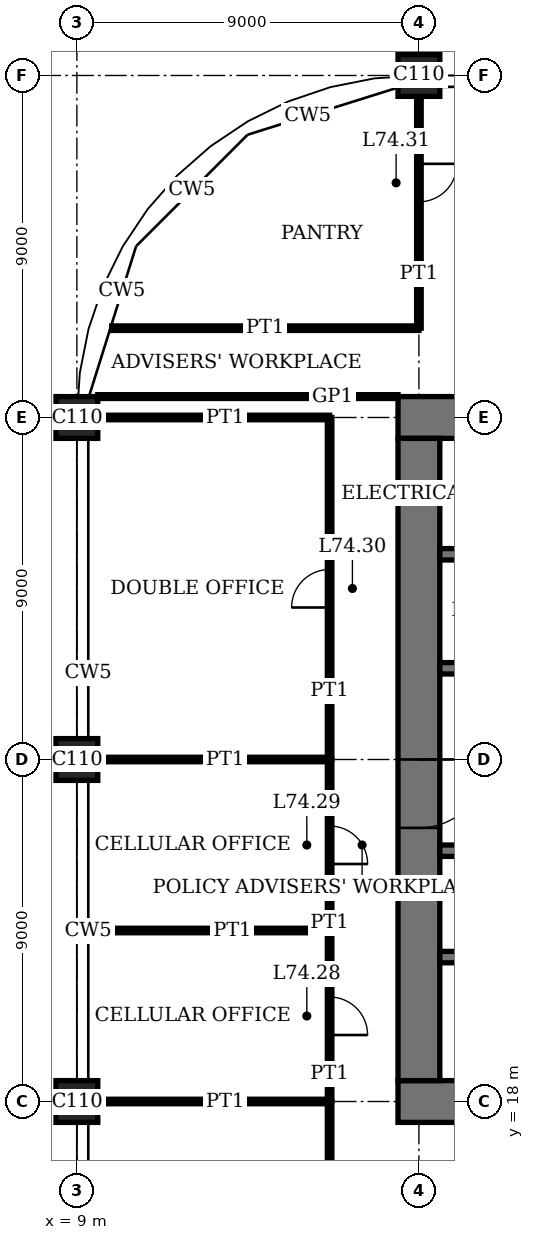
"""IFC4 building model, lengths in metres.
Left out: names, types, materials, properties, quantities, classifications, styles, units other than length and angle.
Written with IfcOpenShell. Run it as: python <this file> out.ifc"""

import sys

from ifc_helpers import new_model, si_unit, direction, frame, frame_2d, origin, origin_2d, place, context, subcontext, project, spatial, rectangle, extrude, element, fill, save


model = new_model("IFC4")
c1 = context("Model", 3, precision=1e-05, world=origin(), true_north=direction((0.0, 1.0)))
c2 = subcontext(c1, "Body", "Model", "MODEL_VIEW")
j1 = project(units=[si_unit("LENGTHUNIT", "METRE"), si_unit("PLANEANGLEUNIT", "RADIAN")], contexts=[c1])
p1 = place(None, origin())
s1 = spatial("IfcSite", under=j1, at=p1, CompositionType="ELEMENT")
p2 = place(p1, origin())
s2 = spatial("IfcBuilding", under=s1, at=p2, CompositionType="ELEMENT")
p3 = place(p2, frame((0.0, 0.0, 303.4)))
s3 = spatial("IfcBuildingStorey", under=s2, at=p3, CompositionType="ELEMENT", Elevation=303.4)
for number, where, z_axis, x_axis in (
    (1, (9.0, 18.0, 0.0), (0.0, 0.0, 1.0), (1.0, 0.0, 0.0)),
    (2, (9.0, 27.0, 0.0), (0.0, 0.0, 1.0), (1.0, 0.0, 0.0)),
    (3, (9.0, 36.0, 0.0), (0.0, 0.0, 1.0), (1.0, 0.0, 0.0)),
    (4, (18.0, 45.0, 0.0), (0.0, 0.0, 1.0), (1.0, 0.0, 0.0)),
):
    element("IfcColumn", number, at=place(p3, frame(where, z_axis=z_axis, x_axis=x_axis)), inside=s3, PredefinedType="COLUMN", context=c2, shape_type="SweptSolid", body=[
        extrude(rectangle(XDim=1.1, YDim=1.1, at=origin_2d()), origin(), (0.0, 0.0, 1.0), 4.0),
    ])
p4 = place(p3, frame((17.45, 18.0, 0.0), z_axis=(0.0, 0.0, 1.0), x_axis=(1.0, 0.0, 0.0)))
e5 = element("IfcWall", 5, at=p4, inside=s3, PredefinedType="SHEAR", context=c2, shape_type="SweptSolid", body=[
    extrude(rectangle(XDim=28.1, YDim=1.1, at=frame_2d((14.05, 0.0))), origin(), (0.0, 0.0, 1.0), 4.0),
])
p5 = place(p4, frame((11.55, 0.0, 0.0)))
e6 = element("IfcOpeningElement", 6, at=p5, cuts=e5, PredefinedType="OPENING", context=c2, shape_type="SweptSolid", body=[
    extrude(rectangle(XDim=1.0, YDim=2.4, at=frame_2d((0.5, 1.2))), frame((0.0, 0.56, 0.0), z_axis=(0.0, -1.0, 0.0), x_axis=(1.0, 0.0, 0.0)), (0.0, 0.0, 1.0), 1.12),
])
p6 = place(p4, frame((16.55, 0.0, 0.0)))
e7 = element("IfcOpeningElement", 7, at=p6, cuts=e5, PredefinedType="OPENING", context=c2, shape_type="SweptSolid", body=[
    extrude(rectangle(XDim=1.0, YDim=2.4, at=frame_2d((0.5, 1.2))), frame((0.0, 0.56, 0.0), z_axis=(0.0, -1.0, 0.0), x_axis=(1.0, 0.0, 0.0)), (0.0, 0.0, 1.0), 1.12),
])
p7 = place(p4, frame((20.0, 0.0, 0.0)))
e8 = element("IfcOpeningElement", 8, at=p7, cuts=e5, PredefinedType="OPENING", context=c2, shape_type="SweptSolid", body=[
    extrude(rectangle(XDim=1.1, YDim=2.4, at=frame_2d((0.55, 1.2))), frame((0.0, 0.56, 0.0), z_axis=(0.0, -1.0, 0.0), x_axis=(1.0, 0.0, 0.0)), (0.0, 0.0, 1.0), 1.12),
])
p8 = place(p4, frame((24.05, 0.0, 0.0)))
e9 = element("IfcOpeningElement", 9, at=p8, cuts=e5, PredefinedType="OPENING", context=c2, shape_type="SweptSolid", body=[
    extrude(rectangle(XDim=1.0, YDim=2.4, at=frame_2d((0.5, 1.2))), frame((0.0, 0.56, 0.0), z_axis=(0.0, -1.0, 0.0), x_axis=(1.0, 0.0, 0.0)), (0.0, 0.0, 1.0), 1.12),
])
p9 = place(p3, frame((45.55, 36.0, 0.0), z_axis=(0.0, 0.0, 1.0), x_axis=(-1.0, 0.0, 0.0)))
e10 = element("IfcWall", 10, at=p9, inside=s3, PredefinedType="SHEAR", context=c2, shape_type="SweptSolid", body=[
    extrude(rectangle(XDim=28.1, YDim=1.1, at=frame_2d((14.05, 0.0))), origin(), (0.0, 0.0, 1.0), 4.0),
])
p10 = place(p9, frame((11.55, 0.0, 0.0)))
e11 = element("IfcOpeningElement", 11, at=p10, cuts=e10, PredefinedType="OPENING", context=c2, shape_type="SweptSolid", body=[
    extrude(rectangle(XDim=1.0, YDim=2.4, at=frame_2d((0.5, 1.2))), frame((0.0, 0.56, 0.0), z_axis=(0.0, -1.0, 0.0), x_axis=(1.0, 0.0, 0.0)), (0.0, 0.0, 1.0), 1.12),
])
p11 = place(p9, frame((16.55, 0.0, 0.0)))
e12 = element("IfcOpeningElement", 12, at=p11, cuts=e10, PredefinedType="OPENING", context=c2, shape_type="SweptSolid", body=[
    extrude(rectangle(XDim=1.0, YDim=2.4, at=frame_2d((0.5, 1.2))), frame((0.0, 0.56, 0.0), z_axis=(0.0, -1.0, 0.0), x_axis=(1.0, 0.0, 0.0)), (0.0, 0.0, 1.0), 1.12),
])
p12 = place(p9, frame((20.0, 0.0, 0.0)))
e13 = element("IfcOpeningElement", 13, at=p12, cuts=e10, PredefinedType="OPENING", context=c2, shape_type="SweptSolid", body=[
    extrude(rectangle(XDim=1.1, YDim=2.4, at=frame_2d((0.55, 1.2))), frame((0.0, 0.56, 0.0), z_axis=(0.0, -1.0, 0.0), x_axis=(1.0, 0.0, 0.0)), (0.0, 0.0, 1.0), 1.12),
])
p13 = place(p9, frame((24.05, 0.0, 0.0)))
e14 = element("IfcOpeningElement", 14, at=p13, cuts=e10, PredefinedType="OPENING", context=c2, shape_type="SweptSolid", body=[
    extrude(rectangle(XDim=1.0, YDim=2.4, at=frame_2d((0.5, 1.2))), frame((0.0, 0.56, 0.0), z_axis=(0.0, -1.0, 0.0), x_axis=(1.0, 0.0, 0.0)), (0.0, 0.0, 1.0), 1.12),
])
p14 = place(p3, frame((18.0, 35.45, 0.0), z_axis=(0.0, 0.0, 1.0), x_axis=(0.0, -1.0, 0.0)))
e15 = element("IfcWall", 15, at=p14, inside=s3, PredefinedType="SHEAR", context=c2, shape_type="SweptSolid", body=[
    extrude(rectangle(XDim=16.9, YDim=1.1, at=frame_2d((8.45, 0.0))), origin(), (0.0, 0.0, 1.0), 4.0),
])
p15 = place(p14, frame((8.45, 0.0, 0.0)))
e16 = element("IfcOpeningElement", 16, at=p15, cuts=e15, PredefinedType="OPENING", context=c2, shape_type="SweptSolid", body=[
    extrude(rectangle(XDim=1.8, YDim=2.4, at=frame_2d((0.9, 1.2))), frame((0.0, 0.56, 0.0), z_axis=(0.0, -1.0, 0.0), x_axis=(1.0, 0.0, 0.0)), (0.0, 0.0, 1.0), 1.12),
])
p16 = place(p3, frame((18.55, 21.8, 0.0), z_axis=(0.0, 0.0, 1.0), x_axis=(1.0, 0.0, 0.0)))
e17 = element("IfcWall", 17, at=p16, inside=s3, PredefinedType="SHEAR", context=c2, shape_type="SweptSolid", body=[
    extrude(rectangle(XDim=8.3, YDim=0.3, at=frame_2d((4.15, 0.0))), origin(), (0.0, 0.0, 1.0), 4.0),
])
p17 = place(p16, frame((6.85, 0.0, 0.0)))
e18 = element("IfcOpeningElement", 18, at=p17, cuts=e17, PredefinedType="OPENING", context=c2, shape_type="SweptSolid", body=[
    extrude(rectangle(XDim=1.0, YDim=2.4, at=frame_2d((0.5, 1.2))), frame((0.0, 0.16, 0.0), z_axis=(0.0, -1.0, 0.0), x_axis=(1.0, 0.0, 0.0)), (0.0, 0.0, 1.0), 0.32),
])
p18 = place(p3, frame((18.55, 24.6, 0.0), z_axis=(0.0, 0.0, 1.0), x_axis=(1.0, 0.0, 0.0)))
e19 = element("IfcWall", 19, at=p18, inside=s3, PredefinedType="SHEAR", context=c2, shape_type="SweptSolid", body=[
    extrude(rectangle(XDim=25.9, YDim=0.3, at=frame_2d((12.95, 0.0))), origin(), (0.0, 0.0, 1.0), 4.0),
])
p19 = place(p18, frame((4.95, 0.0, 0.0)))
e20 = element("IfcOpeningElement", 20, at=p19, cuts=e19, PredefinedType="OPENING", context=c2, shape_type="SweptSolid", body=[
    extrude(rectangle(XDim=1.0, YDim=2.4, at=frame_2d((0.5, 1.2))), frame((0.0, 0.16, 0.0), z_axis=(0.0, -1.0, 0.0), x_axis=(1.0, 0.0, 0.0)), (0.0, 0.0, 1.0), 0.32),
])
p20 = place(p18, frame((24.5, 0.0, 0.0)))
e21 = element("IfcOpeningElement", 21, at=p20, cuts=e19, PredefinedType="OPENING", context=c2, shape_type="SweptSolid", body=[
    extrude(rectangle(XDim=0.9, YDim=2.1, at=frame_2d((0.45, 1.05))), frame((0.0, 0.16, 0.0), z_axis=(0.0, -1.0, 0.0), x_axis=(1.0, 0.0, 0.0)), (0.0, 0.0, 1.0), 0.32),
])
p21 = place(p18, frame((9.4, 0.0, 0.0)))
e22 = element("IfcOpeningElement", 22, at=p21, cuts=e19, PredefinedType="OPENING", context=c2, shape_type="SweptSolid", body=[
    extrude(rectangle(XDim=1.1, YDim=2.4, at=frame_2d((0.55, 1.2))), frame((0.0, 0.16, 0.0), z_axis=(0.0, -1.0, 0.0), x_axis=(1.0, 0.0, 0.0)), (0.0, 0.0, 1.0), 0.32),
])
p22 = place(p18, frame((12.4, 0.0, 0.0)))
e23 = element("IfcOpeningElement", 23, at=p22, cuts=e19, PredefinedType="OPENING", context=c2, shape_type="SweptSolid", body=[
    extrude(rectangle(XDim=1.1, YDim=2.4, at=frame_2d((0.55, 1.2))), frame((0.0, 0.16, 0.0), z_axis=(0.0, -1.0, 0.0), x_axis=(1.0, 0.0, 0.0)), (0.0, 0.0, 1.0), 0.32),
])
p23 = place(p18, frame((15.4, 0.0, 0.0)))
e24 = element("IfcOpeningElement", 24, at=p23, cuts=e19, PredefinedType="OPENING", context=c2, shape_type="SweptSolid", body=[
    extrude(rectangle(XDim=1.1, YDim=2.4, at=frame_2d((0.55, 1.2))), frame((0.0, 0.16, 0.0), z_axis=(0.0, -1.0, 0.0), x_axis=(1.0, 0.0, 0.0)), (0.0, 0.0, 1.0), 0.32),
])
p24 = place(p18, frame((18.4, 0.0, 0.0)))
e25 = element("IfcOpeningElement", 25, at=p24, cuts=e19, PredefinedType="OPENING", context=c2, shape_type="SweptSolid", body=[
    extrude(rectangle(XDim=1.1, YDim=2.4, at=frame_2d((0.55, 1.2))), frame((0.0, 0.16, 0.0), z_axis=(0.0, -1.0, 0.0), x_axis=(1.0, 0.0, 0.0)), (0.0, 0.0, 1.0), 0.32),
])
p25 = place(p18, frame((21.3, 0.0, 0.0)))
e26 = element("IfcOpeningElement", 26, at=p25, cuts=e19, PredefinedType="OPENING", context=c2, shape_type="SweptSolid", body=[
    extrude(rectangle(XDim=1.3, YDim=2.4, at=frame_2d((0.65, 1.2))), frame((0.0, 0.16, 0.0), z_axis=(0.0, -1.0, 0.0), x_axis=(1.0, 0.0, 0.0)), (0.0, 0.0, 1.0), 0.32),
])
p26 = place(p3, frame((18.55, 29.4, 0.0), z_axis=(0.0, 0.0, 1.0), x_axis=(1.0, 0.0, 0.0)))
e27 = element("IfcWall", 27, at=p26, inside=s3, PredefinedType="SHEAR", context=c2, shape_type="SweptSolid", body=[
    extrude(rectangle(XDim=25.9, YDim=0.3, at=frame_2d((12.95, 0.0))), origin(), (0.0, 0.0, 1.0), 4.0),
])
p27 = place(p26, frame((19.95, 0.0, 0.0)))
e28 = element("IfcOpeningElement", 28, at=p27, cuts=e27, PredefinedType="OPENING", context=c2, shape_type="SweptSolid", body=[
    extrude(rectangle(XDim=1.0, YDim=2.4, at=frame_2d((0.5, 1.2))), frame((0.0, 0.16, 0.0), z_axis=(0.0, -1.0, 0.0), x_axis=(1.0, 0.0, 0.0)), (0.0, 0.0, 1.0), 0.32),
])
p28 = place(p26, frame((0.5, 0.0, 0.0)))
e29 = element("IfcOpeningElement", 29, at=p28, cuts=e27, PredefinedType="OPENING", context=c2, shape_type="SweptSolid", body=[
    extrude(rectangle(XDim=0.9, YDim=2.1, at=frame_2d((0.45, 1.05))), frame((0.0, 0.16, 0.0), z_axis=(0.0, -1.0, 0.0), x_axis=(1.0, 0.0, 0.0)), (0.0, 0.0, 1.0), 0.32),
])
p29 = place(p26, frame((15.45, 0.0, 0.0)))
e30 = element("IfcOpeningElement", 30, at=p29, cuts=e27, PredefinedType="OPENING", context=c2, shape_type="SweptSolid", body=[
    extrude(rectangle(XDim=1.0, YDim=2.4, at=frame_2d((0.5, 1.2))), frame((0.0, 0.16, 0.0), z_axis=(0.0, -1.0, 0.0), x_axis=(1.0, 0.0, 0.0)), (0.0, 0.0, 1.0), 0.32),
])
p30 = place(p26, frame((12.45, 0.0, 0.0)))
e31 = element("IfcOpeningElement", 31, at=p30, cuts=e27, PredefinedType="OPENING", context=c2, shape_type="SweptSolid", body=[
    extrude(rectangle(XDim=1.0, YDim=2.4, at=frame_2d((0.5, 1.2))), frame((0.0, 0.16, 0.0), z_axis=(0.0, -1.0, 0.0), x_axis=(1.0, 0.0, 0.0)), (0.0, 0.0, 1.0), 0.32),
])
p31 = place(p26, frame((9.45, 0.0, 0.0)))
e32 = element("IfcOpeningElement", 32, at=p31, cuts=e27, PredefinedType="OPENING", context=c2, shape_type="SweptSolid", body=[
    extrude(rectangle(XDim=1.0, YDim=2.4, at=frame_2d((0.5, 1.2))), frame((0.0, 0.16, 0.0), z_axis=(0.0, -1.0, 0.0), x_axis=(1.0, 0.0, 0.0)), (0.0, 0.0, 1.0), 0.32),
])
p32 = place(p26, frame((6.45, 0.0, 0.0)))
e33 = element("IfcOpeningElement", 33, at=p32, cuts=e27, PredefinedType="OPENING", context=c2, shape_type="SweptSolid", body=[
    extrude(rectangle(XDim=1.0, YDim=2.4, at=frame_2d((0.5, 1.2))), frame((0.0, 0.16, 0.0), z_axis=(0.0, -1.0, 0.0), x_axis=(1.0, 0.0, 0.0)), (0.0, 0.0, 1.0), 0.32),
])
p33 = place(p26, frame((3.3, 0.0, 0.0)))
e34 = element("IfcOpeningElement", 34, at=p33, cuts=e27, PredefinedType="OPENING", context=c2, shape_type="SweptSolid", body=[
    extrude(rectangle(XDim=1.3, YDim=2.4, at=frame_2d((0.65, 1.2))), frame((0.0, 0.16, 0.0), z_axis=(0.0, -1.0, 0.0), x_axis=(1.0, 0.0, 0.0)), (0.0, 0.0, 1.0), 0.32),
])
p34 = place(p3, frame((18.55, 32.4, 0.0), z_axis=(0.0, 0.0, 1.0), x_axis=(1.0, 0.0, 0.0)))
e35 = element("IfcWall", 35, at=p34, inside=s3, PredefinedType="SHEAR", context=c2, shape_type="SweptSolid", body=[
    extrude(rectangle(XDim=17.3, YDim=0.3, at=frame_2d((8.65, 0.0))), origin(), (0.0, 0.0, 1.0), 4.0),
])
p35 = place(p3, frame((9.55, 18.0, 0.0), z_axis=(0.0, 0.0, 1.0), x_axis=(1.0, 0.0, 0.0)))
e36 = element("IfcWall", 36, at=p35, inside=s3, PredefinedType="PARTITIONING", context=c2, shape_type="SweptSolid", body=[
    extrude(rectangle(XDim=6.1, YDim=0.12, at=frame_2d((3.05, 0.0))), origin(), (0.0, 0.0, 1.0), 3.05),
])
p36 = place(p3, frame((9.31, 22.5, 0.0), z_axis=(0.0, 0.0, 1.0), x_axis=(1.0, 0.0, 0.0)))
e37 = element("IfcWall", 37, at=p36, inside=s3, PredefinedType="PARTITIONING", context=c2, shape_type="SweptSolid", body=[
    extrude(rectangle(XDim=6.34, YDim=0.12, at=frame_2d((3.17, 0.0))), origin(), (0.0, 0.0, 1.0), 3.1),
])
for number, where, z_axis, x_axis in (
    (38, (9.55, 27.0, 0.0), (0.0, 0.0, 1.0), (1.0, 0.0, 0.0)),
    (39, (9.55, 36.0, 0.0), (0.0, 0.0, 1.0), (1.0, 0.0, 0.0)),
):
    element("IfcWall", number, at=place(p3, frame(where, z_axis=z_axis, x_axis=x_axis)), inside=s3, PredefinedType="PARTITIONING", context=c2, shape_type="SweptSolid", body=[
        extrude(rectangle(XDim=6.1, YDim=0.12, at=frame_2d((3.05, 0.0))), origin(), (0.0, 0.0, 1.0), 3.05),
    ])
p37 = place(p3, frame((9.55, 36.55, 0.0), z_axis=(0.0, 0.0, 1.0), x_axis=(1.0, 0.0, 0.0)))
e40 = element("IfcWall", 40, at=p37, inside=s3, PredefinedType="PARTITIONING", context=c2, shape_type="SweptSolid", body=[
    extrude(rectangle(XDim=7.9, YDim=0.1, at=frame_2d((3.95, 0.0))), origin(), (0.0, 0.0, 1.0), 3.75),
])
p38 = place(p3, frame((9.918, 38.35, 0.0), z_axis=(0.0, 0.0, 1.0), x_axis=(1.0, 0.0, 0.0)))
e41 = element("IfcWall", 41, at=p38, inside=s3, PredefinedType="PARTITIONING", context=c2, shape_type="SweptSolid", body=[
    extrude(rectangle(XDim=8.082, YDim=0.12, at=frame_2d((4.041, 0.0))), origin(), (0.0, 0.0, 1.0), 3.75),
])
p39 = place(p3, frame((15.65, 9.0, 0.0), z_axis=(0.0, 0.0, 1.0), x_axis=(0.0, 1.0, 0.0)))
e42 = element("IfcWall", 42, at=p39, inside=s3, PredefinedType="PARTITIONING", context=c2, shape_type="SweptSolid", body=[
    extrude(rectangle(XDim=9.0, YDim=0.12, at=frame_2d((4.5, 0.0))), origin(), (0.0, 0.0, 1.0), 3.75),
])
p40 = place(p39, frame((4.0, 0.0, 0.0)))
e43 = element("IfcOpeningElement", 43, at=p40, cuts=e42, PredefinedType="OPENING", context=c2, shape_type="SweptSolid", body=[
    extrude(rectangle(XDim=1.0, YDim=2.4, at=frame_2d((0.5, 1.2))), frame((0.0, 0.07, 0.0), z_axis=(0.0, -1.0, 0.0), x_axis=(1.0, 0.0, 0.0)), (0.0, 0.0, 1.0), 0.14),
])
p41 = place(p3, frame((15.65, 18.0, 0.0), z_axis=(0.0, 0.0, 1.0), x_axis=(0.0, 1.0, 0.0)))
e44 = element("IfcWall", 44, at=p41, inside=s3, PredefinedType="PARTITIONING", context=c2, shape_type="SweptSolid", body=[
    extrude(rectangle(XDim=4.5, YDim=0.12, at=frame_2d((2.25, 0.0))), origin(), (0.0, 0.0, 1.0), 3.75),
])
p42 = place(p41, frame((1.75, 0.0, 0.0)))
e45 = element("IfcOpeningElement", 45, at=p42, cuts=e44, PredefinedType="OPENING", context=c2, shape_type="SweptSolid", body=[
    extrude(rectangle(XDim=1.0, YDim=2.4, at=frame_2d((0.5, 1.2))), frame((0.0, 0.07, 0.0), z_axis=(0.0, -1.0, 0.0), x_axis=(1.0, 0.0, 0.0)), (0.0, 0.0, 1.0), 0.14),
])
p43 = place(p3, frame((15.65, 22.5, 0.0), z_axis=(0.0, 0.0, 1.0), x_axis=(0.0, 1.0, 0.0)))
e46 = element("IfcWall", 46, at=p43, inside=s3, PredefinedType="PARTITIONING", context=c2, shape_type="SweptSolid", body=[
    extrude(rectangle(XDim=4.5, YDim=0.12, at=frame_2d((2.25, 0.0))), origin(), (0.0, 0.0, 1.0), 3.75),
])
p44 = place(p43, frame((1.75, 0.0, 0.0)))
e47 = element("IfcOpeningElement", 47, at=p44, cuts=e46, PredefinedType="OPENING", context=c2, shape_type="SweptSolid", body=[
    extrude(rectangle(XDim=1.0, YDim=2.4, at=frame_2d((0.5, 1.2))), frame((0.0, 0.07, 0.0), z_axis=(0.0, -1.0, 0.0), x_axis=(1.0, 0.0, 0.0)), (0.0, 0.0, 1.0), 0.14),
])
p45 = place(p3, frame((15.65, 27.0, 0.0), z_axis=(0.0, 0.0, 1.0), x_axis=(0.0, 1.0, 0.0)))
e48 = element("IfcWall", 48, at=p45, inside=s3, PredefinedType="PARTITIONING", context=c2, shape_type="SweptSolid", body=[
    extrude(rectangle(XDim=9.0, YDim=0.12, at=frame_2d((4.5, 0.0))), origin(), (0.0, 0.0, 1.0), 3.75),
])
p46 = place(p45, frame((4.0, 0.0, 0.0)))
e49 = element("IfcOpeningElement", 49, at=p46, cuts=e48, PredefinedType="OPENING", context=c2, shape_type="SweptSolid", body=[
    extrude(rectangle(XDim=1.0, YDim=2.4, at=frame_2d((0.5, 1.2))), frame((0.0, 0.07, 0.0), z_axis=(0.0, -1.0, 0.0), x_axis=(1.0, 0.0, 0.0)), (0.0, 0.0, 1.0), 0.14),
])
p47 = place(p3, frame((18.0, 38.35, 0.0), z_axis=(0.0, 0.0, 1.0), x_axis=(0.0, 1.0, 0.0)))
e50 = element("IfcWall", 50, at=p47, inside=s3, PredefinedType="PARTITIONING", context=c2, shape_type="SweptSolid", body=[
    extrude(rectangle(XDim=6.1, YDim=0.12, at=frame_2d((3.05, 0.0))), origin(), (0.0, 0.0, 1.0), 3.05),
])
p48 = place(p47, frame((3.325, 0.0, 0.0)))
e51 = element("IfcOpeningElement", 51, at=p48, cuts=e50, PredefinedType="OPENING", context=c2, shape_type="SweptSolid", body=[
    extrude(rectangle(XDim=1.0, YDim=2.4, at=frame_2d((0.5, 1.2))), frame((0.0, 0.07, 0.0), z_axis=(0.0, -1.0, 0.0), x_axis=(1.0, 0.0, 0.0)), (0.0, 0.0, 1.0), 0.14),
])
p49 = place(p15, origin())
e52 = element("IfcDoor", 52, at=p49, inside=s3, OperationType="DOUBLE_DOOR_DOUBLE_SWING", PredefinedType="DOOR", context=c2, shape_type="SweptSolid", body=[
    extrude(rectangle(XDim=1.8, YDim=2.4, at=frame_2d((0.9, 1.2))), frame((0.0, 0.03, 0.0), z_axis=(0.0, -1.0, 0.0), x_axis=(1.0, 0.0, 0.0)), (0.0, 0.0, 1.0), 0.06),
    extrude(rectangle(XDim=0.04, YDim=2.4, at=frame_2d((0.02, 1.2))), frame((0.0, 0.55, 0.0), z_axis=(0.0, -1.0, 0.0), x_axis=(1.0, 0.0, 0.0)), (0.0, 0.0, 1.0), 1.1),
    extrude(rectangle(XDim=0.04, YDim=2.4, at=frame_2d((1.78, 1.2))), frame((0.0, 0.55, 0.0), z_axis=(0.0, -1.0, 0.0), x_axis=(1.0, 0.0, 0.0)), (0.0, 0.0, 1.0), 1.1),
    extrude(rectangle(XDim=1.8, YDim=0.04, at=frame_2d((0.9, 2.38))), frame((0.0, 0.55, 0.0), z_axis=(0.0, -1.0, 0.0), x_axis=(1.0, 0.0, 0.0)), (0.0, 0.0, 1.0), 1.1),
])
fill(e16, e52)
p50 = place(p42, origin())
e53 = element("IfcDoor", 53, at=p50, inside=s3, OperationType="SINGLE_SWING_LEFT", PredefinedType="DOOR", context=c2, shape_type="SweptSolid", body=[
    extrude(rectangle(XDim=1.0, YDim=2.4, at=frame_2d((0.5, 1.2))), frame((0.0, 0.025, 0.0), z_axis=(0.0, -1.0, 0.0), x_axis=(1.0, 0.0, 0.0)), (0.0, 0.0, 1.0), 0.05),
])
fill(e45, e53)
p51 = place(p44, origin())
e54 = element("IfcDoor", 54, at=p51, inside=s3, OperationType="SINGLE_SWING_LEFT", PredefinedType="DOOR", context=c2, shape_type="SweptSolid", body=[
    extrude(rectangle(XDim=1.0, YDim=2.4, at=frame_2d((0.5, 1.2))), frame((0.0, 0.025, 0.0), z_axis=(0.0, -1.0, 0.0), x_axis=(1.0, 0.0, 0.0)), (0.0, 0.0, 1.0), 0.05),
])
fill(e47, e54)
p52 = place(p46, origin())
e55 = element("IfcDoor", 55, at=p52, inside=s3, OperationType="SINGLE_SWING_RIGHT", PredefinedType="DOOR", context=c2, shape_type="SweptSolid", body=[
    extrude(rectangle(XDim=1.0, YDim=2.4, at=frame_2d((0.5, 1.2))), frame((0.0, 0.025, 0.0), z_axis=(0.0, -1.0, 0.0), x_axis=(1.0, 0.0, 0.0)), (0.0, 0.0, 1.0), 0.05),
])
fill(e49, e55)
p53 = place(p48, origin())
e56 = element("IfcDoor", 56, at=p53, inside=s3, OperationType="SINGLE_SWING_RIGHT", PredefinedType="DOOR", context=c2, shape_type="SweptSolid", body=[
    extrude(rectangle(XDim=1.0, YDim=2.4, at=frame_2d((0.5, 1.2))), frame((0.0, 0.025, 0.0), z_axis=(0.0, -1.0, 0.0), x_axis=(1.0, 0.0, 0.0)), (0.0, 0.0, 1.0), 0.05),
])
fill(e51, e56)
save(model, sys.argv[1])
